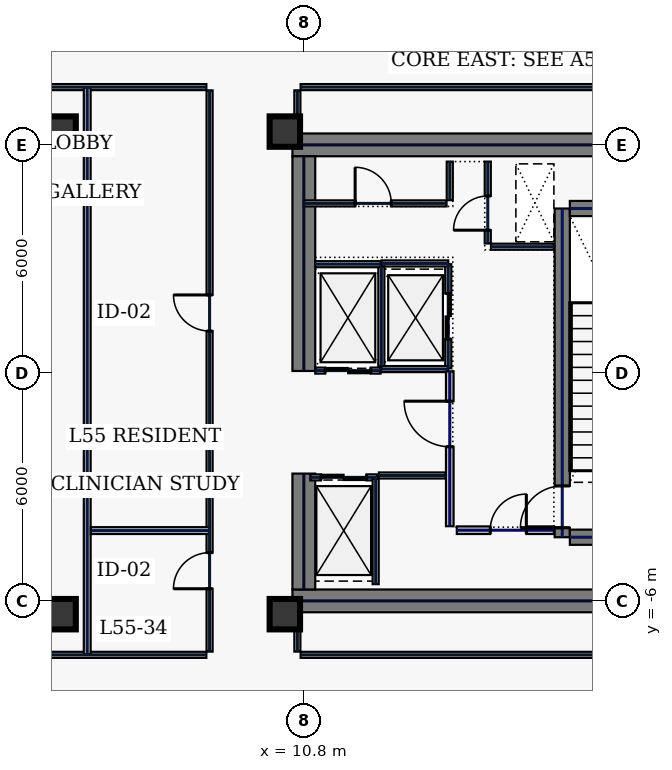
"""IFC4 building model, lengths in metres.
Left out: names, types, materials, properties, quantities, classifications, styles, units other than length and angle.
Written with IfcOpenShell. Run it as: python <this file> out.ifc"""

import sys

from ifc_helpers import new_model, si_unit, direction, frame, frame_2d, origin, origin_2d, place, context, subcontext, project, spatial, rectangle, hollow_rectangle, extrude, element, fill, save


model = new_model("IFC4")
c1 = context("Model", 3, precision=1e-05, world=origin(), true_north=direction((0.0, 1.0)))
c2 = subcontext(c1, "Body", "Model", "MODEL_VIEW")
j1 = project(units=[si_unit("LENGTHUNIT", "METRE"), si_unit("PLANEANGLEUNIT", "RADIAN")], contexts=[c1])
p1 = place(None, origin())
s1 = spatial("IfcSite", under=j1, at=p1, CompositionType="ELEMENT")
p2 = place(p1, origin())
s2 = spatial("IfcBuilding", under=s1, at=p2, CompositionType="ELEMENT")
p3 = place(p2, frame((0.0, 0.0, 238.2)))
s3 = spatial("IfcBuildingStorey", under=s2, at=p3, CompositionType="ELEMENT", Elevation=238.2)
for number, where, z_axis, x_axis in (
    (1, (10.5, 6.0, 0.0), (0.0, 0.0, 1.0), (1.0, 0.0, 0.0)),
    (2, (10.5, -6.0, 0.0), (0.0, 0.0, 1.0), (1.0, 0.0, 0.0)),
):
    element("IfcWall", number, at=place(p3, frame(where, z_axis=z_axis, x_axis=x_axis)), inside=s3, PredefinedType="SHEAR", context=c2, shape_type="SweptSolid", body=[
        extrude(rectangle(XDim=11.5, YDim=0.6, at=frame_2d((5.75, 0.0))), origin(), (0.0, 0.0, 1.0), 4.54),
    ])
p4 = place(p3, frame((10.8, -5.7, 0.0), z_axis=(0.0, 0.0, 1.0), x_axis=(0.0, 1.0, 0.0)))
e3 = element("IfcWall", 3, at=p4, inside=s3, PredefinedType="SHEAR", context=c2, shape_type="SweptSolid", body=[
    extrude(rectangle(XDim=3.05, YDim=0.6, at=frame_2d((1.525, 0.0))), origin(), (0.0, 0.0, 1.0), 4.54),
])
p5 = place(p3, frame((10.8, 0.05, 0.0), z_axis=(0.0, 0.0, 1.0), x_axis=(0.0, 1.0, 0.0)))
e4 = element("IfcWall", 4, at=p5, inside=s3, PredefinedType="SHEAR", context=c2, shape_type="SweptSolid", body=[
    extrude(rectangle(XDim=5.65, YDim=0.6, at=frame_2d((2.825, 0.0))), origin(), (0.0, 0.0, 1.0), 4.54),
])
p6 = place(p3, frame((17.6, -4.325, 0.0), z_axis=(0.0, 0.0, 1.0), x_axis=(0.0, 1.0, 0.0)))
e5 = element("IfcWall", 5, at=p6, inside=s3, PredefinedType="SHEAR", context=c2, shape_type="SweptSolid", body=[
    extrude(rectangle(XDim=8.65, YDim=0.4, at=frame_2d((4.325, 0.0))), origin(), (0.0, 0.0, 1.0), 4.54),
])
p7 = place(p6, frame((0.25, 0.0, 0.0)))
e6 = element("IfcOpeningElement", 6, at=p7, cuts=e5, PredefinedType="OPENING", context=c2, shape_type="SweptSolid", body=[
    extrude(rectangle(XDim=1.1, YDim=2.2, at=frame_2d((0.55, 1.1))), frame((0.0, 0.21, 0.0), z_axis=(0.0, -1.0, 0.0), x_axis=(1.0, 0.0, 0.0)), (0.0, 0.0, 1.0), 0.42),
])
for number, where, z_axis, x_axis in (
    (7, (17.8, -4.325, 0.0), (0.0, 0.0, 1.0), (1.0, 0.0, 0.0)),
    (8, (17.8, 4.325, 0.0), (0.0, 0.0, 1.0), (1.0, 0.0, 0.0)),
):
    element("IfcWall", number, at=place(p3, frame(where, z_axis=z_axis, x_axis=x_axis)), inside=s3, PredefinedType="SHEAR", context=c2, shape_type="SweptSolid", body=[
        extrude(rectangle(XDim=3.4, YDim=0.4, at=frame_2d((1.7, 0.0))), origin(), (0.0, 0.0, 1.0), 4.54),
    ])
for number, where, z_axis, x_axis in (
    (9, (10.3, -6.35, 0.0), (0.0, 0.0, 1.0), (1.0, 0.0, 0.0)),
    (10, (10.3, 6.35, 0.0), (0.0, 0.0, 1.0), (1.0, 0.0, 0.0)),
    (11, (4.4, -6.35, 0.0), (0.0, 0.0, 1.0), (1.0, 0.0, 0.0)),
    (12, (4.4, 6.35, 0.0), (0.0, 0.0, 1.0), (1.0, 0.0, 0.0)),
):
    element("IfcColumn", number, at=place(p3, frame(where, z_axis=z_axis, x_axis=x_axis)), inside=s3, PredefinedType="COLUMN", context=c2, shape_type="SweptSolid", body=[
        extrude(hollow_rectangle(XDim=0.8, YDim=0.8, WallThickness=0.036, at=origin_2d()), origin(), (0.0, 0.0, 1.0), 4.54),
    ])
p8 = place(p3, frame((14.6, 0.12, 0.0), z_axis=(0.0, 0.0, 1.0), x_axis=(0.0, 1.0, 0.0)))
e13 = element("IfcWall", 13, at=p8, inside=s3, PredefinedType="PARTITIONING", context=c2, shape_type="SweptSolid", body=[
    extrude(rectangle(XDim=2.74, YDim=0.16, at=frame_2d((1.37, 0.0))), origin(), (0.0, 0.0, 1.0), 4.54),
])
p9 = place(p8, frame((0.77, 0.0, 0.0)))
e14 = element("IfcOpeningElement", 14, at=p9, cuts=e13, PredefinedType="OPENING", context=c2, shape_type="SweptSolid", body=[
    extrude(rectangle(XDim=1.2, YDim=2.2, at=frame_2d((0.6, 1.1))), frame((0.0, 0.09, 0.0), z_axis=(0.0, -1.0, 0.0), x_axis=(1.0, 0.0, 0.0)), (0.0, 0.0, 1.0), 0.18),
])
for number, where, z_axis, x_axis in (
    (15, (12.84, 0.1, 0.0), (0.0, 0.0, 1.0), (1.0, 0.0, 0.0)),
    (16, (12.84, 2.88, 0.0), (0.0, 0.0, 1.0), (1.0, 0.0, 0.0)),
):
    element("IfcWall", number, at=place(p3, frame(where, z_axis=z_axis, x_axis=x_axis)), inside=s3, PredefinedType="PARTITIONING", context=c2, shape_type="SweptSolid", body=[
        extrude(rectangle(XDim=1.76, YDim=0.16, at=frame_2d((0.88, 0.0))), origin(), (0.0, 0.0, 1.0), 4.54),
    ])
p10 = place(p3, frame((12.84, 0.18, 0.0), z_axis=(0.0, 0.0, 1.0), x_axis=(0.0, 1.0, 0.0)))
e17 = element("IfcWall", 17, at=p10, inside=s3, PredefinedType="PARTITIONING", context=c2, shape_type="SweptSolid", body=[
    extrude(rectangle(XDim=2.62, YDim=0.16, at=frame_2d((1.31, 0.0))), origin(), (0.0, 0.0, 1.0), 4.54),
])
p11 = place(p3, frame((10.97, -2.75, 0.0), z_axis=(0.0, 0.0, 1.0), x_axis=(1.0, 0.0, 0.0)))
e18 = element("IfcWall", 18, at=p11, inside=s3, PredefinedType="PARTITIONING", context=c2, shape_type="SweptSolid", body=[
    extrude(rectangle(XDim=1.76, YDim=0.16, at=frame_2d((0.88, 0.0))), origin(), (0.0, 0.0, 1.0), 4.54),
])
p12 = place(p11, frame((0.28, 0.0, 0.0)))
e19 = element("IfcOpeningElement", 19, at=p12, cuts=e18, PredefinedType="OPENING", context=c2, shape_type="SweptSolid", body=[
    extrude(rectangle(XDim=1.2, YDim=2.2, at=frame_2d((0.6, 1.1))), frame((0.0, 0.09, 0.0), z_axis=(0.0, -1.0, 0.0), x_axis=(1.0, 0.0, 0.0)), (0.0, 0.0, 1.0), 0.18),
])
p13 = place(p3, frame((11.1, 0.06, 0.0), z_axis=(0.0, 0.0, 1.0), x_axis=(1.0, 0.0, 0.0)))
e20 = element("IfcWall", 20, at=p13, inside=s3, PredefinedType="PARTITIONING", context=c2, shape_type="SweptSolid", body=[
    extrude(rectangle(XDim=1.72, YDim=0.16, at=frame_2d((0.86, 0.0))), origin(), (0.0, 0.0, 1.0), 4.54),
])
p14 = place(p13, frame((0.26, 0.0, 0.0)))
e21 = element("IfcOpeningElement", 21, at=p14, cuts=e20, PredefinedType="OPENING", context=c2, shape_type="SweptSolid", body=[
    extrude(rectangle(XDim=1.2, YDim=2.2, at=frame_2d((0.6, 1.1))), frame((0.0, 0.09, 0.0), z_axis=(0.0, -1.0, 0.0), x_axis=(1.0, 0.0, 0.0)), (0.0, 0.0, 1.0), 0.18),
])
p15 = place(p3, frame((11.1, 2.86, 0.0), z_axis=(0.0, 0.0, 1.0), x_axis=(1.0, 0.0, 0.0)))
e22 = element("IfcWall", 22, at=p15, inside=s3, PredefinedType="PARTITIONING", context=c2, shape_type="SweptSolid", body=[
    extrude(rectangle(XDim=1.72, YDim=0.16, at=frame_2d((0.86, 0.0))), origin(), (0.0, 0.0, 1.0), 4.54),
])
p16 = place(p3, frame((15.64, 3.405, 0.0), z_axis=(0.0, 0.0, 1.0), x_axis=(0.0, 1.0, 0.0)))
e23 = element("IfcWall", 23, at=p16, inside=s3, PredefinedType="PARTITIONING", context=c2, shape_type="SweptSolid", body=[
    extrude(rectangle(XDim=2.155, YDim=0.16, at=frame_2d((1.078, 0.0))), origin(), (0.0, 0.0, 1.0), 4.54),
])
p17 = place(p16, frame((0.35, 0.0, 0.0)))
e24 = element("IfcOpeningElement", 24, at=p17, cuts=e23, PredefinedType="OPENING", context=c2, shape_type="SweptSolid", body=[
    extrude(rectangle(XDim=0.9, YDim=2.2, at=frame_2d((0.45, 1.1))), frame((0.0, 0.09, 0.0), z_axis=(0.0, -1.0, 0.0), x_axis=(1.0, 0.0, 0.0)), (0.0, 0.0, 1.0), 0.18),
])
p18 = place(p3, frame((15.725, 3.32, 0.0), z_axis=(0.0, 0.0, 1.0), x_axis=(1.0, 0.0, 0.0)))
e25 = element("IfcWall", 25, at=p18, inside=s3, PredefinedType="PARTITIONING", context=c2, shape_type="SweptSolid", body=[
    extrude(rectangle(XDim=1.655, YDim=0.16, at=frame_2d((0.827, 0.0))), origin(), (0.0, 0.0, 1.0), 4.54),
])
p19 = place(p3, frame((14.825, -4.14, 0.0), z_axis=(0.0, 0.0, 1.0), x_axis=(1.0, 0.0, 0.0)))
e26 = element("IfcWall", 26, at=p19, inside=s3, PredefinedType="SOLIDWALL", context=c2, shape_type="SweptSolid", body=[
    extrude(rectangle(XDim=2.555, YDim=0.2, at=frame_2d((1.277, 0.0))), origin(), (0.0, 0.0, 1.0), 4.54),
])
p20 = place(p19, frame((0.88, 0.0, 0.0)))
e27 = element("IfcOpeningElement", 27, at=p20, cuts=e26, PredefinedType="OPENING", context=c2, shape_type="SweptSolid", body=[
    extrude(rectangle(XDim=0.95, YDim=2.2, at=frame_2d((0.475, 1.1))), frame((0.0, 0.11, 0.0), z_axis=(0.0, -1.0, 0.0), x_axis=(1.0, 0.0, 0.0)), (0.0, 0.0, 1.0), 0.22),
])
p21 = place(p3, frame((12.775, -2.7, 0.0), z_axis=(0.0, 0.0, 1.0), x_axis=(1.0, 0.0, 0.0)))
e28 = element("IfcWall", 28, at=p21, inside=s3, PredefinedType="PARTITIONING", context=c2, shape_type="SweptSolid", body=[
    extrude(rectangle(XDim=1.76, YDim=0.16, at=frame_2d((0.88, 0.0))), origin(), (0.0, 0.0, 1.0), 4.54),
])
p22 = place(p3, frame((12.69, -5.56, 0.0), z_axis=(0.0, 0.0, 1.0), x_axis=(0.0, 1.0, 0.0)))
e29 = element("IfcWall", 29, at=p22, inside=s3, PredefinedType="PARTITIONING", context=c2, shape_type="SweptSolid", body=[
    extrude(rectangle(XDim=2.775, YDim=0.16, at=frame_2d((1.388, 0.0))), origin(), (0.0, 0.0, 1.0), 4.54),
])
p23 = place(p3, frame((10.8, 4.46, 0.0), z_axis=(0.0, 0.0, 1.0), x_axis=(1.0, 0.0, 0.0)))
e30 = element("IfcWall", 30, at=p23, inside=s3, PredefinedType="PARTITIONING", context=c2, shape_type="SweptSolid", body=[
    extrude(rectangle(XDim=3.755, YDim=0.16, at=frame_2d((1.877, 0.0))), origin(), (0.0, 0.0, 1.0), 4.54),
])
p24 = place(p23, frame((1.35, 0.0, 0.0)))
e31 = element("IfcOpeningElement", 31, at=p24, cuts=e30, PredefinedType="OPENING", context=c2, shape_type="SweptSolid", body=[
    extrude(rectangle(XDim=0.95, YDim=2.2, at=frame_2d((0.475, 1.1))), frame((0.0, 0.09, 0.0), z_axis=(0.0, -1.0, 0.0), x_axis=(1.0, 0.0, 0.0)), (0.0, 0.0, 1.0), 0.18),
])
p25 = place(p3, frame((14.64, 4.545, 0.0), z_axis=(0.0, 0.0, 1.0), x_axis=(0.0, 1.0, 0.0)))
e32 = element("IfcWall", 32, at=p25, inside=s3, PredefinedType="PARTITIONING", context=c2, shape_type="SweptSolid", body=[
    extrude(rectangle(XDim=1.015, YDim=0.16, at=frame_2d((0.508, 0.0))), origin(), (0.0, 0.0, 1.0), 4.54),
])
p26 = place(p3, frame((14.64, -4.035, 0.0), z_axis=(0.0, 0.0, 1.0), x_axis=(0.0, 1.0, 0.0)))
e33 = element("IfcWall", 33, at=p26, inside=s3, PredefinedType="SOLIDWALL", context=c2, shape_type="SweptSolid", body=[
    extrude(rectangle(XDim=4.075, YDim=0.2, at=frame_2d((2.038, 0.0))), origin(), (0.0, 0.0, 1.0), 4.54),
])
p27 = place(p26, frame((2.09, 0.0, 0.0)))
e34 = element("IfcOpeningElement", 34, at=p27, cuts=e33, PredefinedType="OPENING", context=c2, shape_type="SweptSolid", body=[
    extrude(rectangle(XDim=1.2, YDim=2.2, at=frame_2d((0.6, 1.1))), frame((0.0, 0.11, 0.0), z_axis=(0.0, -1.0, 0.0), x_axis=(1.0, 0.0, 0.0)), (0.0, 0.0, 1.0), 0.22),
])
p28 = place(p3, frame((24.815, 7.52, 0.0), z_axis=(0.0, 0.0, 1.0), x_axis=(-1.0, 0.0, 0.0)))
e35 = element("IfcWall", 35, at=p28, inside=s3, PredefinedType="PARTITIONING", context=c2, shape_type="SweptSolid", body=[
    extrude(rectangle(XDim=14.1, YDim=0.16, at=frame_2d((7.05, 0.0))), origin(), (0.0, 0.0, 1.0), 4.54),
])
p29 = place(p3, frame((10.63, 7.435, 0.0), z_axis=(0.0, 0.0, 1.0), x_axis=(0.0, -1.0, 0.0)))
e36 = element("IfcWall", 36, at=p29, inside=s3, PredefinedType="PARTITIONING", context=c2, shape_type="SweptSolid", body=[
    extrude(rectangle(XDim=1.015, YDim=0.16, at=frame_2d((0.508, 0.0))), origin(), (0.0, 0.0, 1.0), 4.54),
])
p30 = place(p3, frame((10.63, -6.42, 0.0), z_axis=(0.0, 0.0, 1.0), x_axis=(0.0, -1.0, 0.0)))
e37 = element("IfcWall", 37, at=p30, inside=s3, PredefinedType="PARTITIONING", context=c2, shape_type="SweptSolid", body=[
    extrude(rectangle(XDim=0.915, YDim=0.16, at=frame_2d((0.458, 0.0))), origin(), (0.0, 0.0, 1.0), 4.54),
])
p31 = place(p3, frame((10.715, -7.42, 0.0), z_axis=(0.0, 0.0, 1.0), x_axis=(1.0, 0.0, 0.0)))
e38 = element("IfcWall", 38, at=p31, inside=s3, PredefinedType="PARTITIONING", context=c2, shape_type="SweptSolid", body=[
    extrude(rectangle(XDim=14.1, YDim=0.16, at=frame_2d((7.05, 0.0))), origin(), (0.0, 0.0, 1.0), 4.54),
])
for number, where, z_axis, x_axis in (
    (39, (8.235, 7.52, 0.0), (0.0, 0.0, 1.0), (-1.0, 0.0, 0.0)),
    (40, (1.415, -7.42, 0.0), (0.0, 0.0, 1.0), (1.0, 0.0, 0.0)),
):
    element("IfcWall", number, at=place(p3, frame(where, z_axis=z_axis, x_axis=x_axis)), inside=s3, PredefinedType="PARTITIONING", context=c2, shape_type="SweptSolid", body=[
        extrude(rectangle(XDim=6.82, YDim=0.16, at=frame_2d((3.41, 0.0))), origin(), (0.0, 0.0, 1.0), 4.54),
    ])
p32 = place(p3, frame((8.32, -7.335, 0.0), z_axis=(0.0, 0.0, 1.0), x_axis=(0.0, 1.0, 0.0)))
e41 = element("IfcWall", 41, at=p32, inside=s3, PredefinedType="PARTITIONING", context=c2, shape_type="SweptSolid", body=[
    extrude(rectangle(XDim=14.77, YDim=0.16, at=frame_2d((7.385, 0.0))), origin(), (0.0, 0.0, 1.0), 4.54),
])
p33 = place(p32, frame((1.654, 0.0, 0.0)))
e42 = element("IfcOpeningElement", 42, at=p33, cuts=e41, PredefinedType="OPENING", context=c2, shape_type="SweptSolid", body=[
    extrude(rectangle(XDim=0.95, YDim=2.2, at=frame_2d((0.475, 1.1))), frame((0.0, 0.09, 0.0), z_axis=(0.0, -1.0, 0.0), x_axis=(1.0, 0.0, 0.0)), (0.0, 0.0, 1.0), 0.18),
])
p34 = place(p32, frame((8.436, 0.0, 0.0)))
e43 = element("IfcOpeningElement", 43, at=p34, cuts=e41, PredefinedType="OPENING", context=c2, shape_type="SweptSolid", body=[
    extrude(rectangle(XDim=0.95, YDim=2.2, at=frame_2d((0.475, 1.1))), frame((0.0, 0.09, 0.0), z_axis=(0.0, -1.0, 0.0), x_axis=(1.0, 0.0, 0.0)), (0.0, 0.0, 1.0), 0.18),
])
p35 = place(p3, frame((5.1, -7.415, 0.0), z_axis=(0.0, 0.0, 1.0), x_axis=(0.0, 1.0, 0.0)))
e44 = element("IfcWall", 44, at=p35, inside=s3, PredefinedType="PARTITIONING", context=c2, shape_type="SweptSolid", body=[
    extrude(rectangle(XDim=14.93, YDim=0.18, at=frame_2d((7.465, 0.0))), origin(), (0.0, 0.0, 1.0), 4.54),
])
p36 = place(p3, frame((5.195, -4.15, 0.0), z_axis=(0.0, 0.0, 1.0), x_axis=(1.0, 0.0, 0.0)))
e45 = element("IfcWall", 45, at=p36, inside=s3, PredefinedType="PARTITIONING", context=c2, shape_type="SweptSolid", body=[
    extrude(rectangle(XDim=3.12, YDim=0.18, at=frame_2d((1.56, 0.0))), origin(), (0.0, 0.0, 1.0), 4.54),
])
p37 = place(p7, origin())
e46 = element("IfcDoor", 46, at=p37, inside=s3, OperationType="SINGLE_SWING_LEFT", PredefinedType="DOOR", context=c2, shape_type="SweptSolid", body=[
    extrude(rectangle(XDim=1.1, YDim=2.2, at=frame_2d((0.55, 1.1))), frame((0.0, 0.025, 0.0), z_axis=(0.0, -1.0, 0.0), x_axis=(1.0, 0.0, 0.0)), (0.0, 0.0, 1.0), 0.05),
])
fill(e6, e46)
p38 = place(p9, origin())
e47 = element("IfcDoor", 47, at=p38, inside=s3, OperationType="SLIDING_TO_LEFT", PredefinedType="DOOR", context=c2, shape_type="SweptSolid", body=[
    extrude(rectangle(XDim=1.2, YDim=2.2, at=frame_2d((0.6, 1.1))), frame((0.0, 0.025, 0.0), z_axis=(0.0, -1.0, 0.0), x_axis=(1.0, 0.0, 0.0)), (0.0, 0.0, 1.0), 0.05),
])
fill(e14, e47)
p39 = place(p12, origin())
e48 = element("IfcDoor", 48, at=p39, inside=s3, OperationType="SLIDING_TO_LEFT", PredefinedType="DOOR", context=c2, shape_type="SweptSolid", body=[
    extrude(rectangle(XDim=1.2, YDim=2.2, at=frame_2d((0.6, 1.1))), frame((0.0, 0.025, 0.0), z_axis=(0.0, -1.0, 0.0), x_axis=(1.0, 0.0, 0.0)), (0.0, 0.0, 1.0), 0.05),
])
fill(e19, e48)
p40 = place(p14, origin())
e49 = element("IfcDoor", 49, at=p40, inside=s3, OperationType="SLIDING_TO_LEFT", PredefinedType="DOOR", context=c2, shape_type="SweptSolid", body=[
    extrude(rectangle(XDim=1.2, YDim=2.2, at=frame_2d((0.6, 1.1))), frame((0.0, 0.025, 0.0), z_axis=(0.0, -1.0, 0.0), x_axis=(1.0, 0.0, 0.0)), (0.0, 0.0, 1.0), 0.05),
])
fill(e21, e49)
p41 = place(p17, origin())
e50 = element("IfcDoor", 50, at=p41, inside=s3, OperationType="SINGLE_SWING_LEFT", PredefinedType="DOOR", context=c2, shape_type="SweptSolid", body=[
    extrude(rectangle(XDim=0.9, YDim=2.2, at=frame_2d((0.45, 1.1))), frame((0.0, 0.025, 0.0), z_axis=(0.0, -1.0, 0.0), x_axis=(1.0, 0.0, 0.0)), (0.0, 0.0, 1.0), 0.05),
])
fill(e24, e50)
p42 = place(p20, origin())
e51 = element("IfcDoor", 51, at=p42, inside=s3, OperationType="SINGLE_SWING_RIGHT", PredefinedType="DOOR", context=c2, shape_type="SweptSolid", body=[
    extrude(rectangle(XDim=0.95, YDim=2.2, at=frame_2d((0.475, 1.1))), frame((0.0, 0.025, 0.0), z_axis=(0.0, -1.0, 0.0), x_axis=(1.0, 0.0, 0.0)), (0.0, 0.0, 1.0), 0.05),
])
fill(e27, e51)
p43 = place(p24, origin())
e52 = element("IfcDoor", 52, at=p43, inside=s3, OperationType="SINGLE_SWING_LEFT", PredefinedType="DOOR", context=c2, shape_type="SweptSolid", body=[
    extrude(rectangle(XDim=0.95, YDim=2.2, at=frame_2d((0.475, 1.1))), frame((0.0, 0.025, 0.0), z_axis=(0.0, -1.0, 0.0), x_axis=(1.0, 0.0, 0.0)), (0.0, 0.0, 1.0), 0.05),
])
fill(e31, e52)
p44 = place(p27, origin())
e53 = element("IfcDoor", 53, at=p44, inside=s3, OperationType="SINGLE_SWING_RIGHT", PredefinedType="DOOR", context=c2, shape_type="SweptSolid", body=[
    extrude(rectangle(XDim=1.2, YDim=2.2, at=frame_2d((0.6, 1.1))), frame((0.0, 0.025, 0.0), z_axis=(0.0, -1.0, 0.0), x_axis=(1.0, 0.0, 0.0)), (0.0, 0.0, 1.0), 0.05),
])
fill(e34, e53)
p45 = place(p33, origin())
e54 = element("IfcDoor", 54, at=p45, inside=s3, OperationType="SINGLE_SWING_LEFT", PredefinedType="DOOR", context=c2, shape_type="SweptSolid", body=[
    extrude(rectangle(XDim=0.95, YDim=2.2, at=frame_2d((0.475, 1.1))), frame((0.0, 0.025, 0.0), z_axis=(0.0, -1.0, 0.0), x_axis=(1.0, 0.0, 0.0)), (0.0, 0.0, 1.0), 0.05),
])
fill(e42, e54)
p46 = place(p34, origin())
e55 = element("IfcDoor", 55, at=p46, inside=s3, OperationType="SINGLE_SWING_RIGHT", PredefinedType="DOOR", context=c2, shape_type="SweptSolid", body=[
    extrude(rectangle(XDim=0.95, YDim=2.2, at=frame_2d((0.475, 1.1))), frame((0.0, 0.025, 0.0), z_axis=(0.0, -1.0, 0.0), x_axis=(1.0, 0.0, 0.0)), (0.0, 0.0, 1.0), 0.05),
])
fill(e43, e55)
save(model, sys.argv[1])
